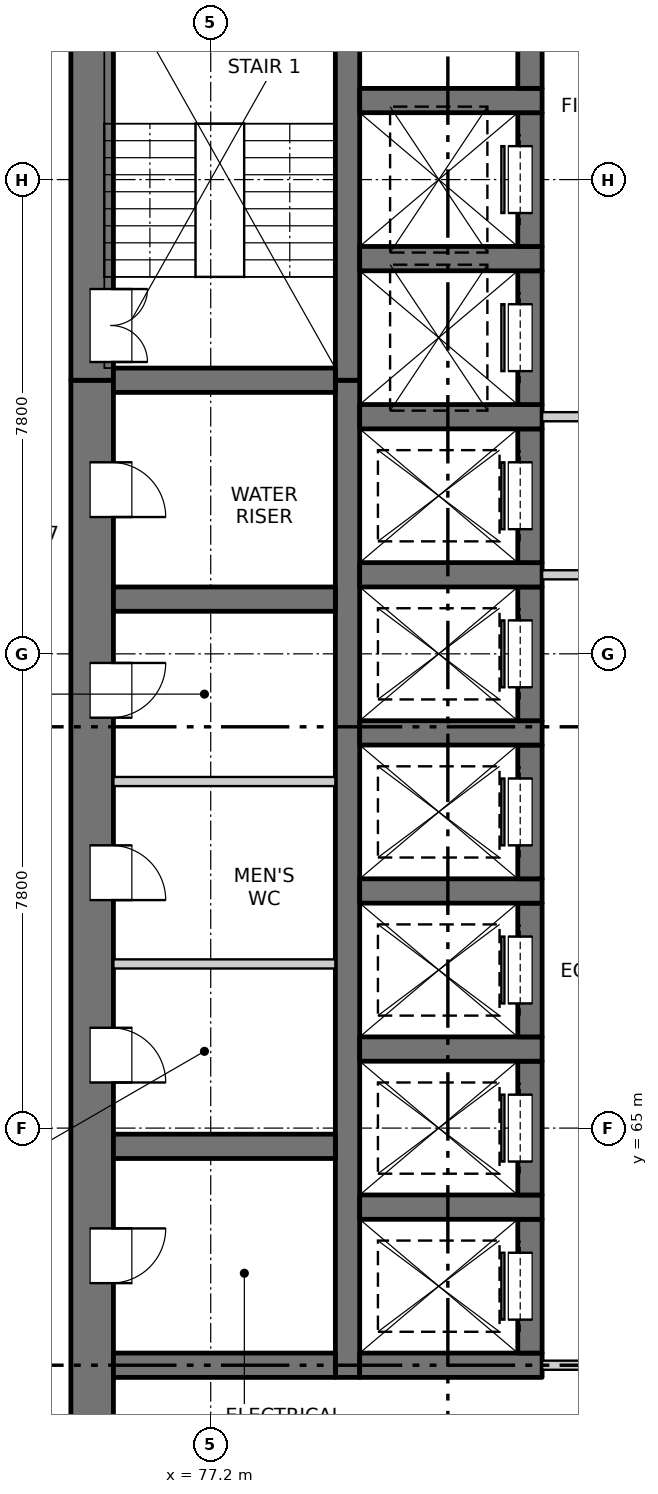
"""IFC4 building model, lengths in metres.
Left out: names, types, materials, properties, quantities, classifications, styles, units other than length and angle.
Written with IfcOpenShell. Run it as: python <this file> out.ifc"""

import sys

from ifc_helpers import new_model, si_unit, direction, frame, frame_2d, origin, place, context, subcontext, project, spatial, rectangle, extrude, element, fill, save


model = new_model("IFC4")
c1 = context("Model", 3, precision=1e-05, world=origin(), true_north=direction((0.0, 1.0)))
c2 = subcontext(c1, "Body", "Model", "MODEL_VIEW")
j1 = project(units=[si_unit("LENGTHUNIT", "METRE"), si_unit("PLANEANGLEUNIT", "RADIAN")], contexts=[c1])
p1 = place(None, origin())
s1 = spatial("IfcSite", under=j1, at=p1, CompositionType="ELEMENT")
p2 = place(p1, origin())
s2 = spatial("IfcBuilding", under=s1, at=p2, CompositionType="ELEMENT")
p3 = place(p2, frame((0.0, 0.0, 71.6)))
s3 = spatial("IfcBuildingStorey", under=s2, at=p3, CompositionType="ELEMENT", Elevation=71.6)
p4 = place(p3, frame((75.25, 54.9, -0.25), z_axis=(0.0, 0.0, 1.0), x_axis=(0.0, 1.0, 0.0)))
e1 = element("IfcWall", 1, at=p4, inside=s3, PredefinedType="SOLIDWALL", context=c2, shape_type="SweptSolid", body=[
    extrude(rectangle(XDim=22.4, YDim=0.7, at=frame_2d((11.2, 0.0))), origin(), (0.0, 0.0, 1.0), 3.4),
])
p5 = place(p4, frame((7.55, 0.0, 0.25)))
e2 = element("IfcOpeningElement", 2, at=p5, cuts=e1, PredefinedType="OPENING", context=c2, shape_type="SweptSolid", body=[
    extrude(rectangle(XDim=0.9, YDim=2.1, at=frame_2d((0.45, 1.05))), frame((0.0, 0.36, 0.0), z_axis=(0.0, -1.0, 0.0), x_axis=(1.0, 0.0, 0.0)), (0.0, 0.0, 1.0), 0.72),
])
p6 = place(p4, frame((10.85, 0.0, 0.25)))
e3 = element("IfcOpeningElement", 3, at=p6, cuts=e1, PredefinedType="OPENING", context=c2, shape_type="SweptSolid", body=[
    extrude(rectangle(XDim=0.9, YDim=2.1, at=frame_2d((0.45, 1.05))), frame((0.0, 0.36, 0.0), z_axis=(0.0, -1.0, 0.0), x_axis=(1.0, 0.0, 0.0)), (0.0, 0.0, 1.0), 0.72),
])
p7 = place(p4, frame((13.85, 0.0, 0.25)))
e4 = element("IfcOpeningElement", 4, at=p7, cuts=e1, PredefinedType="OPENING", context=c2, shape_type="SweptSolid", body=[
    extrude(rectangle(XDim=0.9, YDim=2.1, at=frame_2d((0.45, 1.05))), frame((0.0, 0.36, 0.0), z_axis=(0.0, -1.0, 0.0), x_axis=(1.0, 0.0, 0.0)), (0.0, 0.0, 1.0), 0.72),
])
p8 = place(p4, frame((16.85, 0.0, 0.25)))
e5 = element("IfcOpeningElement", 5, at=p8, cuts=e1, PredefinedType="OPENING", context=c2, shape_type="SweptSolid", body=[
    extrude(rectangle(XDim=0.9, YDim=2.1, at=frame_2d((0.45, 1.05))), frame((0.0, 0.36, 0.0), z_axis=(0.0, -1.0, 0.0), x_axis=(1.0, 0.0, 0.0)), (0.0, 0.0, 1.0), 0.72),
])
p9 = place(p4, frame((20.15, 0.0, 0.25)))
e6 = element("IfcOpeningElement", 6, at=p9, cuts=e1, PredefinedType="OPENING", context=c2, shape_type="SweptSolid", body=[
    extrude(rectangle(XDim=0.9, YDim=2.1, at=frame_2d((0.45, 1.05))), frame((0.0, 0.36, 0.0), z_axis=(0.0, -1.0, 0.0), x_axis=(1.0, 0.0, 0.0)), (0.0, 0.0, 1.0), 0.72),
])
p10 = place(p3, frame((75.25, 77.3, -0.25), z_axis=(0.0, 0.0, 1.0), x_axis=(0.0, 1.0, 0.0)))
e7 = element("IfcWall", 7, at=p10, inside=s3, PredefinedType="SOLIDWALL", context=c2, shape_type="SweptSolid", body=[
    extrude(rectangle(XDim=7.55, YDim=0.7, at=frame_2d((3.775, 0.0))), origin(), (0.0, 0.0, 1.0), 3.4),
])
p11 = place(p10, frame((0.3, 0.0, 0.25)))
e8 = element("IfcOpeningElement", 8, at=p11, cuts=e7, PredefinedType="OPENING", context=c2, shape_type="SweptSolid", body=[
    extrude(rectangle(XDim=1.2, YDim=2.1, at=frame_2d((0.6, 1.05))), frame((0.0, 0.36, 0.0), z_axis=(0.0, -1.0, 0.0), x_axis=(1.0, 0.0, 0.0)), (0.0, 0.0, 1.0), 0.72),
])
p12 = place(p3, frame((79.45, 60.9, -0.25), z_axis=(0.0, 0.0, 1.0), x_axis=(0.0, 1.0, 0.0)))
e9 = element("IfcWall", 9, at=p12, inside=s3, PredefinedType="SOLIDWALL", context=c2, shape_type="SweptSolid", body=[
    extrude(rectangle(XDim=16.4, YDim=0.4, at=frame_2d((8.2, 0.0))), origin(), (0.0, 0.0, 1.0), 3.4),
])
p13 = place(p3, frame((79.45, 77.3, -0.25), z_axis=(0.0, 0.0, 1.0), x_axis=(0.0, 1.0, 0.0)))
e10 = element("IfcWall", 10, at=p13, inside=s3, PredefinedType="SOLIDWALL", context=c2, shape_type="SweptSolid", body=[
    extrude(rectangle(XDim=6.85, YDim=0.4, at=frame_2d((3.425, 0.0))), origin(), (0.0, 0.0, 1.0), 3.4),
])
p14 = place(p3, frame((79.65, 61.1, -0.25), z_axis=(0.0, 0.0, 1.0), x_axis=(1.0, 0.0, 0.0)))
e11 = element("IfcWall", 11, at=p14, inside=s3, PredefinedType="SOLIDWALL", context=c2, shape_type="SweptSolid", body=[
    extrude(rectangle(XDim=3.0, YDim=0.4, at=frame_2d((1.5, 0.0))), origin(), (0.0, 0.0, 1.0), 3.4),
])
p15 = place(p3, frame((82.45, 61.3, -0.25), z_axis=(0.0, 0.0, 1.0), x_axis=(0.0, 1.0, 0.0)))
e12 = element("IfcWall", 12, at=p15, inside=s3, PredefinedType="SOLIDWALL", context=c2, shape_type="SweptSolid", body=[
    extrude(rectangle(XDim=2.2, YDim=0.4, at=frame_2d((1.1, 0.0))), origin(), (0.0, 0.0, 1.0), 3.4),
])
p16 = place(p15, frame((0.55, 0.0, 0.25)))
e13 = element("IfcOpeningElement", 13, at=p16, cuts=e12, PredefinedType="OPENING", context=c2, shape_type="SweptSolid", body=[
    extrude(rectangle(XDim=1.1, YDim=2.1, at=frame_2d((0.55, 1.05))), frame((0.0, 0.21, 0.0), z_axis=(0.0, -1.0, 0.0), x_axis=(1.0, 0.0, 0.0)), (0.0, 0.0, 1.0), 0.42),
])
p17 = place(p3, frame((79.65, 63.7, -0.25), z_axis=(0.0, 0.0, 1.0), x_axis=(1.0, 0.0, 0.0)))
e14 = element("IfcWall", 14, at=p17, inside=s3, PredefinedType="SOLIDWALL", context=c2, shape_type="SweptSolid", body=[
    extrude(rectangle(XDim=3.0, YDim=0.4, at=frame_2d((1.5, 0.0))), origin(), (0.0, 0.0, 1.0), 3.4),
])
p18 = place(p3, frame((82.45, 63.9, -0.25), z_axis=(0.0, 0.0, 1.0), x_axis=(0.0, 1.0, 0.0)))
e15 = element("IfcWall", 15, at=p18, inside=s3, PredefinedType="SOLIDWALL", context=c2, shape_type="SweptSolid", body=[
    extrude(rectangle(XDim=2.2, YDim=0.4, at=frame_2d((1.1, 0.0))), origin(), (0.0, 0.0, 1.0), 3.4),
])
p19 = place(p18, frame((0.55, 0.0, 0.25)))
e16 = element("IfcOpeningElement", 16, at=p19, cuts=e15, PredefinedType="OPENING", context=c2, shape_type="SweptSolid", body=[
    extrude(rectangle(XDim=1.1, YDim=2.1, at=frame_2d((0.55, 1.05))), frame((0.0, 0.21, 0.0), z_axis=(0.0, -1.0, 0.0), x_axis=(1.0, 0.0, 0.0)), (0.0, 0.0, 1.0), 0.42),
])
p20 = place(p3, frame((79.65, 66.3, -0.25), z_axis=(0.0, 0.0, 1.0), x_axis=(1.0, 0.0, 0.0)))
e17 = element("IfcWall", 17, at=p20, inside=s3, PredefinedType="SOLIDWALL", context=c2, shape_type="SweptSolid", body=[
    extrude(rectangle(XDim=3.0, YDim=0.4, at=frame_2d((1.5, 0.0))), origin(), (0.0, 0.0, 1.0), 3.4),
])
p21 = place(p3, frame((82.45, 66.5, -0.25), z_axis=(0.0, 0.0, 1.0), x_axis=(0.0, 1.0, 0.0)))
e18 = element("IfcWall", 18, at=p21, inside=s3, PredefinedType="SOLIDWALL", context=c2, shape_type="SweptSolid", body=[
    extrude(rectangle(XDim=2.2, YDim=0.4, at=frame_2d((1.1, 0.0))), origin(), (0.0, 0.0, 1.0), 3.4),
])
p22 = place(p21, frame((0.55, 0.0, 0.25)))
e19 = element("IfcOpeningElement", 19, at=p22, cuts=e18, PredefinedType="OPENING", context=c2, shape_type="SweptSolid", body=[
    extrude(rectangle(XDim=1.1, YDim=2.1, at=frame_2d((0.55, 1.05))), frame((0.0, 0.21, 0.0), z_axis=(0.0, -1.0, 0.0), x_axis=(1.0, 0.0, 0.0)), (0.0, 0.0, 1.0), 0.42),
])
p23 = place(p3, frame((79.65, 68.9, -0.25), z_axis=(0.0, 0.0, 1.0), x_axis=(1.0, 0.0, 0.0)))
e20 = element("IfcWall", 20, at=p23, inside=s3, PredefinedType="SOLIDWALL", context=c2, shape_type="SweptSolid", body=[
    extrude(rectangle(XDim=3.0, YDim=0.4, at=frame_2d((1.5, 0.0))), origin(), (0.0, 0.0, 1.0), 3.4),
])
p24 = place(p3, frame((82.45, 69.1, -0.25), z_axis=(0.0, 0.0, 1.0), x_axis=(0.0, 1.0, 0.0)))
e21 = element("IfcWall", 21, at=p24, inside=s3, PredefinedType="SOLIDWALL", context=c2, shape_type="SweptSolid", body=[
    extrude(rectangle(XDim=2.2, YDim=0.4, at=frame_2d((1.1, 0.0))), origin(), (0.0, 0.0, 1.0), 3.4),
])
p25 = place(p24, frame((0.55, 0.0, 0.25)))
e22 = element("IfcOpeningElement", 22, at=p25, cuts=e21, PredefinedType="OPENING", context=c2, shape_type="SweptSolid", body=[
    extrude(rectangle(XDim=1.1, YDim=2.1, at=frame_2d((0.55, 1.05))), frame((0.0, 0.21, 0.0), z_axis=(0.0, -1.0, 0.0), x_axis=(1.0, 0.0, 0.0)), (0.0, 0.0, 1.0), 0.42),
])
p26 = place(p3, frame((79.65, 71.5, -0.25), z_axis=(0.0, 0.0, 1.0), x_axis=(1.0, 0.0, 0.0)))
e23 = element("IfcWall", 23, at=p26, inside=s3, PredefinedType="SOLIDWALL", context=c2, shape_type="SweptSolid", body=[
    extrude(rectangle(XDim=3.0, YDim=0.4, at=frame_2d((1.5, 0.0))), origin(), (0.0, 0.0, 1.0), 3.4),
])
p27 = place(p3, frame((82.45, 71.7, -0.25), z_axis=(0.0, 0.0, 1.0), x_axis=(0.0, 1.0, 0.0)))
e24 = element("IfcWall", 24, at=p27, inside=s3, PredefinedType="SOLIDWALL", context=c2, shape_type="SweptSolid", body=[
    extrude(rectangle(XDim=2.2, YDim=0.4, at=frame_2d((1.1, 0.0))), origin(), (0.0, 0.0, 1.0), 3.4),
])
p28 = place(p27, frame((0.55, 0.0, 0.25)))
e25 = element("IfcOpeningElement", 25, at=p28, cuts=e24, PredefinedType="OPENING", context=c2, shape_type="SweptSolid", body=[
    extrude(rectangle(XDim=1.1, YDim=2.1, at=frame_2d((0.55, 1.05))), frame((0.0, 0.21, 0.0), z_axis=(0.0, -1.0, 0.0), x_axis=(1.0, 0.0, 0.0)), (0.0, 0.0, 1.0), 0.42),
])
p29 = place(p3, frame((79.65, 74.1, -0.25), z_axis=(0.0, 0.0, 1.0), x_axis=(1.0, 0.0, 0.0)))
e26 = element("IfcWall", 26, at=p29, inside=s3, PredefinedType="SOLIDWALL", context=c2, shape_type="SweptSolid", body=[
    extrude(rectangle(XDim=3.0, YDim=0.4, at=frame_2d((1.5, 0.0))), origin(), (0.0, 0.0, 1.0), 3.4),
])
p30 = place(p3, frame((82.45, 74.3, -0.25), z_axis=(0.0, 0.0, 1.0), x_axis=(0.0, 1.0, 0.0)))
e27 = element("IfcWall", 27, at=p30, inside=s3, PredefinedType="SOLIDWALL", context=c2, shape_type="SweptSolid", body=[
    extrude(rectangle(XDim=2.2, YDim=0.4, at=frame_2d((1.1, 0.0))), origin(), (0.0, 0.0, 1.0), 3.4),
])
p31 = place(p30, frame((0.55, 0.0, 0.25)))
e28 = element("IfcOpeningElement", 28, at=p31, cuts=e27, PredefinedType="OPENING", context=c2, shape_type="SweptSolid", body=[
    extrude(rectangle(XDim=1.1, YDim=2.1, at=frame_2d((0.55, 1.05))), frame((0.0, 0.21, 0.0), z_axis=(0.0, -1.0, 0.0), x_axis=(1.0, 0.0, 0.0)), (0.0, 0.0, 1.0), 0.42),
])
p32 = place(p3, frame((79.65, 76.7, -0.25), z_axis=(0.0, 0.0, 1.0), x_axis=(1.0, 0.0, 0.0)))
e29 = element("IfcWall", 29, at=p32, inside=s3, PredefinedType="SOLIDWALL", context=c2, shape_type="SweptSolid", body=[
    extrude(rectangle(XDim=3.0, YDim=0.4, at=frame_2d((1.5, 0.0))), origin(), (0.0, 0.0, 1.0), 3.4),
])
p33 = place(p3, frame((82.45, 76.9, -0.25), z_axis=(0.0, 0.0, 1.0), x_axis=(0.0, 1.0, 0.0)))
e30 = element("IfcWall", 30, at=p33, inside=s3, PredefinedType="SOLIDWALL", context=c2, shape_type="SweptSolid", body=[
    extrude(rectangle(XDim=2.2, YDim=0.4, at=frame_2d((1.1, 0.0))), origin(), (0.0, 0.0, 1.0), 3.4),
])
p34 = place(p33, frame((0.55, 0.0, 0.25)))
e31 = element("IfcOpeningElement", 31, at=p34, cuts=e30, PredefinedType="OPENING", context=c2, shape_type="SweptSolid", body=[
    extrude(rectangle(XDim=1.1, YDim=2.1, at=frame_2d((0.55, 1.05))), frame((0.0, 0.21, 0.0), z_axis=(0.0, -1.0, 0.0), x_axis=(1.0, 0.0, 0.0)), (0.0, 0.0, 1.0), 0.42),
])
p35 = place(p3, frame((79.65, 79.3, -0.25), z_axis=(0.0, 0.0, 1.0), x_axis=(1.0, 0.0, 0.0)))
e32 = element("IfcWall", 32, at=p35, inside=s3, PredefinedType="SOLIDWALL", context=c2, shape_type="SweptSolid", body=[
    extrude(rectangle(XDim=3.0, YDim=0.4, at=frame_2d((1.5, 0.0))), origin(), (0.0, 0.0, 1.0), 3.4),
])
p36 = place(p3, frame((82.45, 79.5, -0.25), z_axis=(0.0, 0.0, 1.0), x_axis=(0.0, 1.0, 0.0)))
e33 = element("IfcWall", 33, at=p36, inside=s3, PredefinedType="SOLIDWALL", context=c2, shape_type="SweptSolid", body=[
    extrude(rectangle(XDim=2.2, YDim=0.4, at=frame_2d((1.1, 0.0))), origin(), (0.0, 0.0, 1.0), 3.4),
])
p37 = place(p36, frame((0.55, 0.0, 0.25)))
e34 = element("IfcOpeningElement", 34, at=p37, cuts=e33, PredefinedType="OPENING", context=c2, shape_type="SweptSolid", body=[
    extrude(rectangle(XDim=1.1, YDim=2.1, at=frame_2d((0.55, 1.05))), frame((0.0, 0.21, 0.0), z_axis=(0.0, -1.0, 0.0), x_axis=(1.0, 0.0, 0.0)), (0.0, 0.0, 1.0), 0.42),
])
p38 = place(p3, frame((79.65, 81.9, -0.25), z_axis=(0.0, 0.0, 1.0), x_axis=(1.0, 0.0, 0.0)))
e35 = element("IfcWall", 35, at=p38, inside=s3, PredefinedType="SOLIDWALL", context=c2, shape_type="SweptSolid", body=[
    extrude(rectangle(XDim=3.0, YDim=0.4, at=frame_2d((1.5, 0.0))), origin(), (0.0, 0.0, 1.0), 3.4),
])
p39 = place(p3, frame((82.45, 82.1, -0.25), z_axis=(0.0, 0.0, 1.0), x_axis=(0.0, 1.0, 0.0)))
e36 = element("IfcWall", 36, at=p39, inside=s3, PredefinedType="SOLIDWALL", context=c2, shape_type="SweptSolid", body=[
    extrude(rectangle(XDim=2.05, YDim=0.4, at=frame_2d((1.025, 0.0))), origin(), (0.0, 0.0, 1.0), 3.4),
])
p40 = place(p39, frame((0.65, 0.0, 0.25)))
e37 = element("IfcOpeningElement", 37, at=p40, cuts=e36, PredefinedType="OPENING", context=c2, shape_type="SweptSolid", body=[
    extrude(rectangle(XDim=0.9, YDim=2.1, at=frame_2d((0.45, 1.05))), frame((0.0, 0.21, 0.0), z_axis=(0.0, -1.0, 0.0), x_axis=(1.0, 0.0, 0.0)), (0.0, 0.0, 1.0), 0.42),
])
for number, where, z_axis, x_axis in (
    (38, (75.6, 61.1, -0.25), (0.0, 0.0, 1.0), (1.0, 0.0, 0.0)),
    (39, (75.6, 64.7, -0.25), (0.0, 0.0, 1.0), (1.0, 0.0, 0.0)),
    (40, (75.6, 73.7, -0.25), (0.0, 0.0, 1.0), (1.0, 0.0, 0.0)),
    (41, (75.6, 77.3, -0.25), (0.0, 0.0, 1.0), (1.0, 0.0, 0.0)),
):
    element("IfcWall", number, at=place(p3, frame(where, z_axis=z_axis, x_axis=x_axis)), inside=s3, PredefinedType="SOLIDWALL", context=c2, shape_type="SweptSolid", body=[
        extrude(rectangle(XDim=3.65, YDim=0.4, at=frame_2d((1.825, 0.0))), origin(), (0.0, 0.0, 1.0), 3.4),
    ])
p41 = place(p3, frame((82.65, 61.1, 0.0), z_axis=(0.0, 0.0, 1.0), x_axis=(1.0, 0.0, 0.0)))
e42 = element("IfcWall", 42, at=p41, inside=s3, PredefinedType="PARTITIONING", context=c2, shape_type="SweptSolid", body=[
    extrude(rectangle(XDim=4.7, YDim=0.15, at=frame_2d((2.35, 0.0))), origin(), (0.0, 0.0, 1.0), 3.15),
])
p42 = place(p41, frame((1.45, 0.0, 0.0)))
e43 = element("IfcOpeningElement", 43, at=p42, cuts=e42, PredefinedType="OPENING", context=c2, shape_type="SweptSolid", body=[
    extrude(rectangle(XDim=1.8, YDim=2.1, at=frame_2d((0.9, 1.05))), frame((0.0, 0.085, 0.0), z_axis=(0.0, -1.0, 0.0), x_axis=(1.0, 0.0, 0.0)), (0.0, 0.0, 1.0), 0.17),
])
for number, where, z_axis, x_axis in (
    (44, (75.6, 67.7, 0.0), (0.0, 0.0, 1.0), (1.0, 0.0, 0.0)),
    (45, (75.6, 70.7, 0.0), (0.0, 0.0, 1.0), (1.0, 0.0, 0.0)),
):
    element("IfcWall", number, at=place(p3, frame(where, z_axis=z_axis, x_axis=x_axis)), inside=s3, PredefinedType="PARTITIONING", context=c2, shape_type="SweptSolid", body=[
        extrude(rectangle(XDim=3.65, YDim=0.15, at=frame_2d((1.825, 0.0))), origin(), (0.0, 0.0, 1.0), 3.15),
    ])
p43 = place(p3, frame((82.65, 74.1, 0.0), z_axis=(0.0, 0.0, 1.0), x_axis=(1.0, 0.0, 0.0)))
e46 = element("IfcWall", 46, at=p43, inside=s3, PredefinedType="PARTITIONING", context=c2, shape_type="SweptSolid", body=[
    extrude(rectangle(XDim=4.7, YDim=0.15, at=frame_2d((2.35, 0.0))), origin(), (0.0, 0.0, 1.0), 3.15),
])
p44 = place(p43, frame((1.45, 0.0, 0.0)))
e47 = element("IfcOpeningElement", 47, at=p44, cuts=e46, PredefinedType="OPENING", context=c2, shape_type="SweptSolid", body=[
    extrude(rectangle(XDim=1.8, YDim=2.1, at=frame_2d((0.9, 1.05))), frame((0.0, 0.085, 0.0), z_axis=(0.0, -1.0, 0.0), x_axis=(1.0, 0.0, 0.0)), (0.0, 0.0, 1.0), 0.17),
])
p45 = place(p3, frame((82.65, 76.7, 0.0), z_axis=(0.0, 0.0, 1.0), x_axis=(1.0, 0.0, 0.0)))
e48 = element("IfcWall", 48, at=p45, inside=s3, PredefinedType="PARTITIONING", context=c2, shape_type="SweptSolid", body=[
    extrude(rectangle(XDim=4.7, YDim=0.15, at=frame_2d((2.35, 0.0))), origin(), (0.0, 0.0, 1.0), 3.15),
])
p46 = place(p45, frame((1.45, 0.0, 0.0)))
e49 = element("IfcOpeningElement", 49, at=p46, cuts=e48, PredefinedType="OPENING", context=c2, shape_type="SweptSolid", body=[
    extrude(rectangle(XDim=1.8, YDim=2.1, at=frame_2d((0.9, 1.05))), frame((0.0, 0.085, 0.0), z_axis=(0.0, -1.0, 0.0), x_axis=(1.0, 0.0, 0.0)), (0.0, 0.0, 1.0), 0.17),
])
p47 = place(p16, origin())
e50 = element("IfcDoor", 50, at=p47, inside=s3, OperationType="SLIDING_TO_RIGHT", PredefinedType="DOOR", context=c2, shape_type="SweptSolid", body=[
    extrude(rectangle(XDim=1.1, YDim=2.1, at=frame_2d((0.55, 1.05))), frame((0.0, 0.185, 0.0), z_axis=(0.0, -1.0, 0.0), x_axis=(1.0, 0.0, 0.0)), (0.0, 0.0, 1.0), 0.05),
])
fill(e13, e50)
p48 = place(p5, origin())
e51 = element("IfcDoor", 51, at=p48, inside=s3, OperationType="SINGLE_SWING_LEFT", PredefinedType="DOOR", context=c2, shape_type="SweptSolid", body=[
    extrude(rectangle(XDim=0.9, YDim=2.1, at=frame_2d((0.45, 1.05))), frame((0.0, -0.285, 0.0), z_axis=(0.0, -1.0, 0.0), x_axis=(1.0, 0.0, 0.0)), (0.0, 0.0, 1.0), 0.05),
])
fill(e2, e51)
p49 = place(p19, origin())
e52 = element("IfcDoor", 52, at=p49, inside=s3, OperationType="SLIDING_TO_RIGHT", PredefinedType="DOOR", context=c2, shape_type="SweptSolid", body=[
    extrude(rectangle(XDim=1.1, YDim=2.1, at=frame_2d((0.55, 1.05))), frame((0.0, 0.185, 0.0), z_axis=(0.0, -1.0, 0.0), x_axis=(1.0, 0.0, 0.0)), (0.0, 0.0, 1.0), 0.05),
])
fill(e16, e52)
p50 = place(p6, origin())
e53 = element("IfcDoor", 53, at=p50, inside=s3, OperationType="SINGLE_SWING_RIGHT", PredefinedType="DOOR", context=c2, shape_type="SweptSolid", body=[
    extrude(rectangle(XDim=0.9, YDim=2.1, at=frame_2d((0.45, 1.05))), frame((0.0, -0.285, 0.0), z_axis=(0.0, -1.0, 0.0), x_axis=(1.0, 0.0, 0.0)), (0.0, 0.0, 1.0), 0.05),
])
fill(e3, e53)
p51 = place(p22, origin())
e54 = element("IfcDoor", 54, at=p51, inside=s3, OperationType="SLIDING_TO_RIGHT", PredefinedType="DOOR", context=c2, shape_type="SweptSolid", body=[
    extrude(rectangle(XDim=1.1, YDim=2.1, at=frame_2d((0.55, 1.05))), frame((0.0, 0.185, 0.0), z_axis=(0.0, -1.0, 0.0), x_axis=(1.0, 0.0, 0.0)), (0.0, 0.0, 1.0), 0.05),
])
fill(e19, e54)
p52 = place(p7, origin())
e55 = element("IfcDoor", 55, at=p52, inside=s3, OperationType="SINGLE_SWING_RIGHT", PredefinedType="DOOR", context=c2, shape_type="SweptSolid", body=[
    extrude(rectangle(XDim=0.9, YDim=2.1, at=frame_2d((0.45, 1.05))), frame((0.0, -0.285, 0.0), z_axis=(0.0, -1.0, 0.0), x_axis=(1.0, 0.0, 0.0)), (0.0, 0.0, 1.0), 0.05),
])
fill(e4, e55)
p53 = place(p25, origin())
e56 = element("IfcDoor", 56, at=p53, inside=s3, OperationType="SLIDING_TO_LEFT", PredefinedType="DOOR", context=c2, shape_type="SweptSolid", body=[
    extrude(rectangle(XDim=1.1, YDim=2.1, at=frame_2d((0.55, 1.05))), frame((0.0, 0.185, 0.0), z_axis=(0.0, -1.0, 0.0), x_axis=(1.0, 0.0, 0.0)), (0.0, 0.0, 1.0), 0.05),
])
fill(e22, e56)
p54 = place(p8, origin())
e57 = element("IfcDoor", 57, at=p54, inside=s3, OperationType="SINGLE_SWING_LEFT", PredefinedType="DOOR", context=c2, shape_type="SweptSolid", body=[
    extrude(rectangle(XDim=0.9, YDim=2.1, at=frame_2d((0.45, 1.05))), frame((0.0, -0.285, 0.0), z_axis=(0.0, -1.0, 0.0), x_axis=(1.0, 0.0, 0.0)), (0.0, 0.0, 1.0), 0.05),
])
fill(e5, e57)
p55 = place(p28, origin())
e58 = element("IfcDoor", 58, at=p55, inside=s3, OperationType="SLIDING_TO_LEFT", PredefinedType="DOOR", context=c2, shape_type="SweptSolid", body=[
    extrude(rectangle(XDim=1.1, YDim=2.1, at=frame_2d((0.55, 1.05))), frame((0.0, 0.185, 0.0), z_axis=(0.0, -1.0, 0.0), x_axis=(1.0, 0.0, 0.0)), (0.0, 0.0, 1.0), 0.05),
])
fill(e25, e58)
p56 = place(p31, origin())
e59 = element("IfcDoor", 59, at=p56, inside=s3, OperationType="SLIDING_TO_LEFT", PredefinedType="DOOR", context=c2, shape_type="SweptSolid", body=[
    extrude(rectangle(XDim=1.1, YDim=2.1, at=frame_2d((0.55, 1.05))), frame((0.0, 0.185, 0.0), z_axis=(0.0, -1.0, 0.0), x_axis=(1.0, 0.0, 0.0)), (0.0, 0.0, 1.0), 0.05),
])
fill(e28, e59)
p57 = place(p9, origin())
e60 = element("IfcDoor", 60, at=p57, inside=s3, OperationType="SINGLE_SWING_RIGHT", PredefinedType="DOOR", context=c2, shape_type="SweptSolid", body=[
    extrude(rectangle(XDim=0.9, YDim=2.1, at=frame_2d((0.45, 1.05))), frame((0.0, -0.285, 0.0), z_axis=(0.0, -1.0, 0.0), x_axis=(1.0, 0.0, 0.0)), (0.0, 0.0, 1.0), 0.05),
])
fill(e6, e60)
p58 = place(p34, origin())
e61 = element("IfcDoor", 61, at=p58, inside=s3, OperationType="SLIDING_TO_LEFT", PredefinedType="DOOR", context=c2, shape_type="SweptSolid", body=[
    extrude(rectangle(XDim=1.1, YDim=2.1, at=frame_2d((0.55, 1.05))), frame((0.0, 0.185, 0.0), z_axis=(0.0, -1.0, 0.0), x_axis=(1.0, 0.0, 0.0)), (0.0, 0.0, 1.0), 0.05),
])
fill(e31, e61)
p59 = place(p11, origin())
e62 = element("IfcDoor", 62, at=p59, inside=s3, OperationType="DOUBLE_DOOR_SINGLE_SWING", PredefinedType="DOOR", context=c2, shape_type="SweptSolid", body=[
    extrude(rectangle(XDim=1.2, YDim=2.1, at=frame_2d((0.6, 1.05))), frame((0.0, -0.285, 0.0), z_axis=(0.0, -1.0, 0.0), x_axis=(1.0, 0.0, 0.0)), (0.0, 0.0, 1.0), 0.05),
])
fill(e8, e62)
p60 = place(p37, origin())
e63 = element("IfcDoor", 63, at=p60, inside=s3, OperationType="SLIDING_TO_LEFT", PredefinedType="DOOR", context=c2, shape_type="SweptSolid", body=[
    extrude(rectangle(XDim=1.1, YDim=2.1, at=frame_2d((0.55, 1.05))), frame((0.0, 0.185, 0.0), z_axis=(0.0, -1.0, 0.0), x_axis=(1.0, 0.0, 0.0)), (0.0, 0.0, 1.0), 0.05),
])
fill(e34, e63)
save(model, sys.argv[1])
